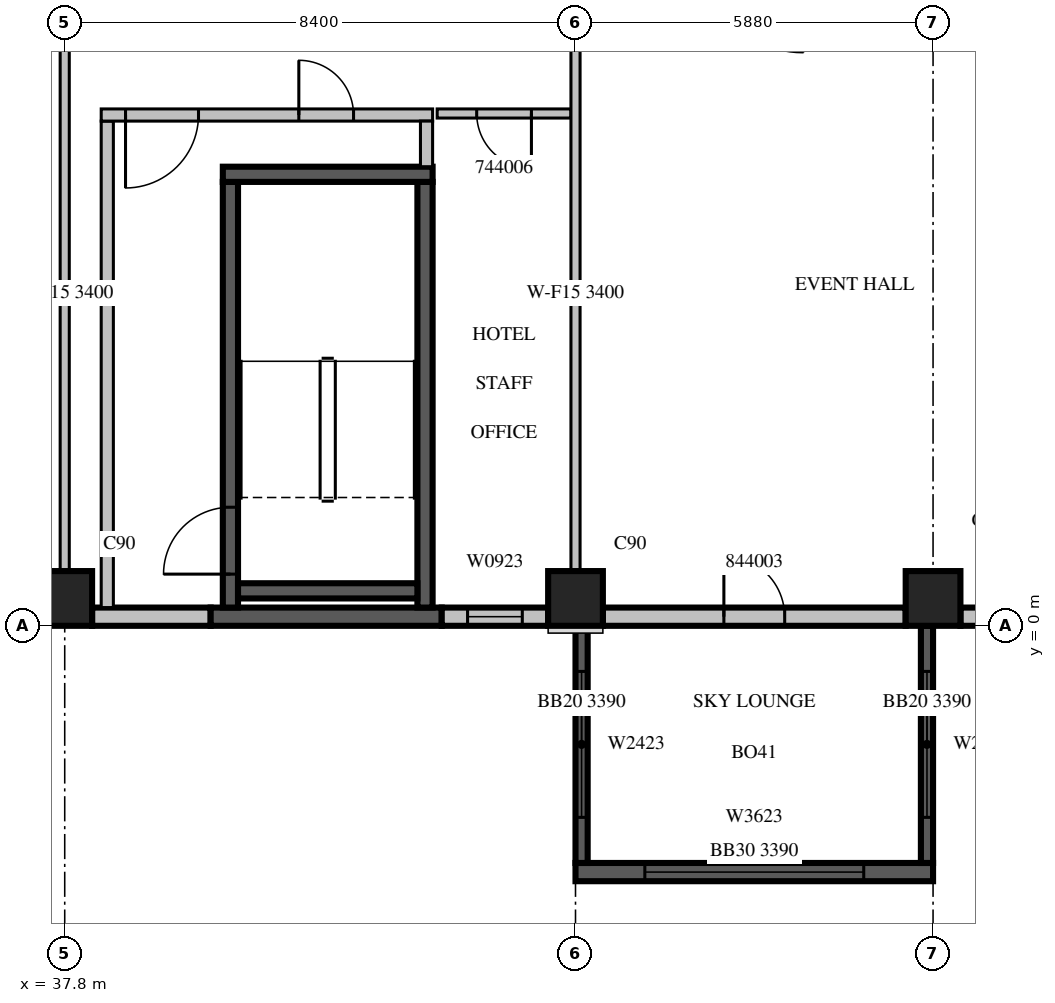
"""IFC4 building model, lengths in metres.
Left out: names, types, materials, properties, quantities, classifications, styles, units other than length and angle.
Written with IfcOpenShell. Run it as: python <this file> out.ifc"""

import sys

from ifc_helpers import new_model, si_unit, direction, frame, frame_2d, origin, origin_2d, place, context, subcontext, project, spatial, rectangle, extrude, source, transform, mapped, element, fill, save


model = new_model("IFC4")
c1 = context("Model", 3, precision=1e-05, world=origin(), true_north=direction((0.0, 1.0)))
c2 = subcontext(c1, "Body", "Model", "MODEL_VIEW")
j1 = project(units=[si_unit("LENGTHUNIT", "METRE"), si_unit("PLANEANGLEUNIT", "RADIAN")], contexts=[c1])
p1 = place(None, origin())
s1 = spatial("IfcSite", under=j1, at=p1, CompositionType="ELEMENT")
p2 = place(p1, origin())
s2 = spatial("IfcBuilding", under=s1, at=p2, CompositionType="ELEMENT")
p3 = place(p2, frame((0.0, 0.0, 200.6)))
s3 = spatial("IfcBuildingStorey", under=s2, at=p3, CompositionType="ELEMENT", Elevation=200.6)
m1 = source(origin(), c2, "Body", "SweptSolid", [
    extrude(rectangle(XDim=0.9, YDim=0.9, at=origin_2d()), origin(), (0.0, 0.0, 1.0), 3.8),
])
for number, where, z_axis, x_axis in (
    (1, (37.8, 0.45, 0.0), (0.0, 0.0, 1.0), (1.0, 0.0, 0.0)),
    (2, (46.2, 0.45, 0.0), (0.0, 0.0, 1.0), (1.0, 0.0, 0.0)),
    (3, (52.08, 0.45, 0.0), (0.0, 0.0, 1.0), (1.0, 0.0, 0.0)),
):
    element("IfcColumn", number, at=place(p3, frame(where, z_axis=z_axis, x_axis=x_axis)), inside=s3, PredefinedType="COLUMN", context=c2, shape_type="MappedRepresentation", body=[
        mapped(m1, transform((0.0, 0.0, 0.0), scale=1.0)),
    ])
m2 = source(origin(), c2, "Body", "SweptSolid", [
    extrude(rectangle(XDim=1.95, YDim=0.3, at=frame_2d((0.975, 0.0))), origin(), (0.0, 0.0, 1.0), 3.4),
])
p4 = place(p3, frame((38.25, 0.15, 0.0), z_axis=(0.0, 0.0, 1.0), x_axis=(1.0, 0.0, 0.0)))
e4 = element("IfcWall", 4, at=p4, inside=s3, PredefinedType="STANDARD", context=c2, shape_type="MappedRepresentation", body=[
    mapped(m2, transform((0.0, 0.0, 0.0), scale=1.0)),
])
m3 = source(origin(), c2, "Body", "SweptSolid", [
    extrude(rectangle(XDim=3.8, YDim=0.3, at=frame_2d((1.9, 0.0))), origin(), (0.0, 0.0, 1.0), 3.4),
])
p5 = place(p3, frame((40.2, 0.15, 0.0), z_axis=(0.0, 0.0, 1.0), x_axis=(1.0, 0.0, 0.0)))
e5 = element("IfcWall", 5, at=p5, inside=s3, PredefinedType="SOLIDWALL", context=c2, shape_type="MappedRepresentation", body=[
    mapped(m3, transform((0.0, 0.0, 0.0), scale=1.0)),
])
m4 = source(origin(), c2, "Body", "SweptSolid", [
    extrude(rectangle(XDim=1.75, YDim=0.3, at=frame_2d((0.875, 0.0))), origin(), (0.0, 0.0, 1.0), 3.4),
])
p6 = place(p3, frame((44.0, 0.15, 0.0), z_axis=(0.0, 0.0, 1.0), x_axis=(1.0, 0.0, 0.0)))
e6 = element("IfcWall", 6, at=p6, inside=s3, PredefinedType="STANDARD", context=c2, shape_type="MappedRepresentation", body=[
    mapped(m4, transform((0.0, 0.0, 0.0), scale=1.0)),
])
m5 = source(origin(), c2, "Body", "SweptSolid", [
    extrude(rectangle(XDim=0.9, YDim=2.3, at=frame_2d((0.45, 1.15))), frame((0.0, 0.16, 0.0), z_axis=(0.0, -1.0, 0.0), x_axis=(1.0, 0.0, 0.0)), (0.0, 0.0, 1.0), 0.32),
])
p7 = place(p6, frame((0.425, 0.0, 0.6)))
e7 = element("IfcOpeningElement", 7, at=p7, cuts=e6, PredefinedType="OPENING", context=c2, shape_type="MappedRepresentation", body=[
    mapped(m5, transform((0.0, 0.0, 0.0), scale=1.0)),
])
m6 = source(origin(), c2, "Body", "SweptSolid", [
    extrude(rectangle(XDim=4.98, YDim=0.3, at=frame_2d((2.49, 0.0))), origin(), (0.0, 0.0, 1.0), 3.4),
])
p8 = place(p3, frame((46.65, 0.15, 0.0), z_axis=(0.0, 0.0, 1.0), x_axis=(1.0, 0.0, 0.0)))
e8 = element("IfcWall", 8, at=p8, inside=s3, PredefinedType="STANDARD", context=c2, shape_type="MappedRepresentation", body=[
    mapped(m6, transform((0.0, 0.0, 0.0), scale=1.0)),
])
m7 = source(origin(), c2, "Body", "SweptSolid", [
    extrude(rectangle(XDim=1.0, YDim=2.1, at=frame_2d((0.5, 1.05))), frame((0.0, 0.16, 0.0), z_axis=(0.0, -1.0, 0.0), x_axis=(1.0, 0.0, 0.0)), (0.0, 0.0, 1.0), 0.32),
])
p9 = place(p8, frame((1.99, 0.0, 0.0)))
e9 = element("IfcOpeningElement", 9, at=p9, cuts=e8, PredefinedType="OPENING", context=c2, shape_type="MappedRepresentation", body=[
    mapped(m7, transform((0.0, 0.0, 0.0), scale=1.0)),
])
m8 = source(origin(), c2, "Body", "SweptSolid", [
    extrude(rectangle(XDim=2.91, YDim=0.3, at=frame_2d((1.455, 0.0))), origin(), (0.0, 0.0, 1.0), 3.4),
])
p10 = place(p3, frame((52.53, 0.15, 0.0), z_axis=(0.0, 0.0, 1.0), x_axis=(1.0, 0.0, 0.0)))
e10 = element("IfcWall", 10, at=p10, inside=s3, PredefinedType="STANDARD", context=c2, shape_type="MappedRepresentation", body=[
    mapped(m8, transform((0.0, 0.0, 0.0), scale=1.0)),
])
m9 = source(origin(), c2, "Body", "SweptSolid", [
    extrude(rectangle(XDim=1.8, YDim=2.3, at=frame_2d((0.9, 1.15))), frame((0.0, 0.16, 0.0), z_axis=(0.0, -1.0, 0.0), x_axis=(1.0, 0.0, 0.0)), (0.0, 0.0, 1.0), 0.32),
])
p11 = place(p10, frame((0.33, 0.0, 0.6)))
e11 = element("IfcOpeningElement", 11, at=p11, cuts=e10, PredefinedType="OPENING", context=c2, shape_type="MappedRepresentation", body=[
    mapped(m9, transform((0.0, 0.0, 0.0), scale=1.0)),
])
m10 = source(origin(), c2, "Body", "SweptSolid", [
    extrude(rectangle(XDim=5.88, YDim=0.3, at=frame_2d((2.94, 0.0))), origin(), (0.0, 0.0, 1.0), 3.39),
])
p12 = place(p3, frame((46.2, -4.05, 0.0), z_axis=(0.0, 0.0, 1.0), x_axis=(1.0, 0.0, 0.0)))
e12 = element("IfcWall", 12, at=p12, inside=s3, PredefinedType="SOLIDWALL", context=c2, shape_type="MappedRepresentation", body=[
    mapped(m10, transform((0.0, 0.0, 0.0), scale=1.0)),
])
m11 = source(origin(), c2, "Body", "SweptSolid", [
    extrude(rectangle(XDim=3.6, YDim=2.3, at=frame_2d((1.8, 1.15))), frame((0.0, 0.16, 0.0), z_axis=(0.0, -1.0, 0.0), x_axis=(1.0, 0.0, 0.0)), (0.0, 0.0, 1.0), 0.32),
])
p13 = place(p12, frame((1.14, 0.0, 0.6)))
e13 = element("IfcOpeningElement", 13, at=p13, cuts=e12, PredefinedType="OPENING", context=c2, shape_type="MappedRepresentation", body=[
    mapped(m11, transform((0.0, 0.0, 0.0), scale=1.0)),
])
m12 = source(origin(), c2, "Body", "SweptSolid", [
    extrude(rectangle(XDim=3.9, YDim=0.2, at=frame_2d((1.95, 0.0))), origin(), (0.0, 0.0, 1.0), 3.39),
])
p14 = place(p3, frame((46.3, 0.0, 0.0), z_axis=(0.0, 0.0, 1.0), x_axis=(0.0, -1.0, 0.0)))
e14 = element("IfcWall", 14, at=p14, inside=s3, PredefinedType="SOLIDWALL", context=c2, shape_type="MappedRepresentation", body=[
    mapped(m12, transform((0.0, 0.0, 0.0), scale=1.0)),
])
m13 = source(origin(), c2, "Body", "SweptSolid", [
    extrude(rectangle(XDim=2.4, YDim=2.3, at=frame_2d((1.2, 1.15))), frame((0.0, 0.11, 0.0), z_axis=(0.0, -1.0, 0.0), x_axis=(1.0, 0.0, 0.0)), (0.0, 0.0, 1.0), 0.22),
])
p15 = place(p14, frame((0.75, 0.0, 0.6)))
e15 = element("IfcOpeningElement", 15, at=p15, cuts=e14, PredefinedType="OPENING", context=c2, shape_type="MappedRepresentation", body=[
    mapped(m13, transform((0.0, 0.0, 0.0), scale=1.0)),
])
p16 = place(p3, frame((51.98, 0.0, 0.0), z_axis=(0.0, 0.0, 1.0), x_axis=(0.0, -1.0, 0.0)))
e16 = element("IfcWall", 16, at=p16, inside=s3, PredefinedType="SOLIDWALL", context=c2, shape_type="MappedRepresentation", body=[
    mapped(m12, transform((0.0, 0.0, 0.0), scale=1.0)),
])
p17 = place(p16, frame((0.75, 0.0, 0.6)))
e17 = element("IfcOpeningElement", 17, at=p17, cuts=e16, PredefinedType="OPENING", context=c2, shape_type="MappedRepresentation", body=[
    mapped(m13, transform((0.0, 0.0, 0.0), scale=1.0)),
])
m14 = source(origin(), c2, "Body", "SweptSolid", [
    extrude(rectangle(XDim=7.0, YDim=0.25, at=frame_2d((3.5, 0.0))), origin(), (0.0, 0.0, 1.0), 3.4),
])
p18 = place(p3, frame((40.525, 0.3, 0.0), z_axis=(0.0, 0.0, 1.0), x_axis=(0.0, 1.0, 0.0)))
e18 = element("IfcWall", 18, at=p18, inside=s3, PredefinedType="SOLIDWALL", context=c2, shape_type="MappedRepresentation", body=[
    mapped(m14, transform((0.0, 0.0, 0.0), scale=1.0)),
])
m15 = source(origin(), c2, "Body", "SweptSolid", [
    extrude(rectangle(XDim=1.1, YDim=2.1, at=frame_2d((0.55, 1.05))), frame((0.0, 0.135, 0.0), z_axis=(0.0, -1.0, 0.0), x_axis=(1.0, 0.0, 0.0)), (0.0, 0.0, 1.0), 0.27),
])
p19 = place(p18, frame((0.55, 0.0, 0.0)))
e19 = element("IfcOpeningElement", 19, at=p19, cuts=e18, PredefinedType="OPENING", context=c2, shape_type="MappedRepresentation", body=[
    mapped(m15, transform((0.0, 0.0, 0.0), scale=1.0)),
])
p20 = place(p3, frame((43.725, 0.3, 0.0), z_axis=(0.0, 0.0, 1.0), x_axis=(0.0, 1.0, 0.0)))
e20 = element("IfcWall", 20, at=p20, inside=s3, PredefinedType="SOLIDWALL", context=c2, shape_type="MappedRepresentation", body=[
    mapped(m14, transform((0.0, 0.0, 0.0), scale=1.0)),
])
m16 = source(origin(), c2, "Body", "SweptSolid", [
    extrude(rectangle(XDim=3.45, YDim=0.25, at=frame_2d((1.725, 0.0))), origin(), (0.0, 0.0, 1.0), 3.4),
])
p21 = place(p3, frame((40.4, 7.425, 0.0), z_axis=(0.0, 0.0, 1.0), x_axis=(1.0, 0.0, 0.0)))
e21 = element("IfcWall", 21, at=p21, inside=s3, PredefinedType="SOLIDWALL", context=c2, shape_type="MappedRepresentation", body=[
    mapped(m16, transform((0.0, 0.0, 0.0), scale=1.0)),
])
m17 = source(origin(), c2, "Body", "SweptSolid", [
    extrude(rectangle(XDim=2.95, YDim=0.25, at=frame_2d((1.475, 0.0))), origin(), (0.0, 0.0, 1.0), 3.4),
])
p22 = place(p3, frame((40.65, 0.575, 0.0), z_axis=(0.0, 0.0, 1.0), x_axis=(1.0, 0.0, 0.0)))
e22 = element("IfcWall", 22, at=p22, inside=s3, PredefinedType="SOLIDWALL", context=c2, shape_type="MappedRepresentation", body=[
    mapped(m17, transform((0.0, 0.0, 0.0), scale=1.0)),
])
m18 = source(origin(), c2, "Body", "SweptSolid", [
    extrude(rectangle(XDim=8.0, YDim=0.2, at=frame_2d((4.0, 0.0))), origin(), (0.0, 0.0, 1.0), 3.4),
])
p23 = place(p3, frame((38.5, 0.3, 0.0), z_axis=(0.0, 0.0, 1.0), x_axis=(0.0, 1.0, 0.0)))
e23 = element("IfcWall", 23, at=p23, inside=s3, PredefinedType="PARTITIONING", context=c2, shape_type="MappedRepresentation", body=[
    mapped(m18, transform((0.0, 0.0, 0.0), scale=1.0)),
])
m19 = source(origin(), c2, "Body", "SweptSolid", [
    extrude(rectangle(XDim=5.45, YDim=0.2, at=frame_2d((2.725, 0.0))), origin(), (0.0, 0.0, 1.0), 3.4),
])
p24 = place(p3, frame((38.4, 8.4, 0.0), z_axis=(0.0, 0.0, 1.0), x_axis=(1.0, 0.0, 0.0)))
e24 = element("IfcWall", 24, at=p24, inside=s3, PredefinedType="PARTITIONING", context=c2, shape_type="MappedRepresentation", body=[
    mapped(m19, transform((0.0, 0.0, 0.0), scale=1.0)),
])
m20 = source(origin(), c2, "Body", "SweptSolid", [
    extrude(rectangle(XDim=1.2, YDim=2.1, at=frame_2d((0.6, 1.05))), frame((0.0, 0.11, 0.0), z_axis=(0.0, -1.0, 0.0), x_axis=(1.0, 0.0, 0.0)), (0.0, 0.0, 1.0), 0.22),
])
p25 = place(p24, frame((0.4, 0.0, 0.0)))
e25 = element("IfcOpeningElement", 25, at=p25, cuts=e24, PredefinedType="OPENING", context=c2, shape_type="MappedRepresentation", body=[
    mapped(m20, transform((0.0, 0.0, 0.0), scale=1.0)),
])
m21 = source(origin(), c2, "Body", "SweptSolid", [
    extrude(rectangle(XDim=0.9, YDim=2.1, at=frame_2d((0.45, 1.05))), frame((0.0, 0.11, 0.0), z_axis=(0.0, -1.0, 0.0), x_axis=(1.0, 0.0, 0.0)), (0.0, 0.0, 1.0), 0.22),
])
p26 = place(p24, frame((3.25, 0.0, 0.0)))
e26 = element("IfcOpeningElement", 26, at=p26, cuts=e24, PredefinedType="OPENING", context=c2, shape_type="MappedRepresentation", body=[
    mapped(m21, transform((0.0, 0.0, 0.0), scale=1.0)),
])
m22 = source(origin(), c2, "Body", "SweptSolid", [
    extrude(rectangle(XDim=0.75, YDim=0.2, at=frame_2d((0.375, 0.0))), origin(), (0.0, 0.0, 1.0), 3.4),
])
p27 = place(p3, frame((43.75, 7.55, 0.0), z_axis=(0.0, 0.0, 1.0), x_axis=(0.0, 1.0, 0.0)))
e27 = element("IfcWall", 27, at=p27, inside=s3, PredefinedType="PARTITIONING", context=c2, shape_type="MappedRepresentation", body=[
    mapped(m22, transform((0.0, 0.0, 0.0), scale=1.0)),
])
m23 = source(origin(), c2, "Body", "SweptSolid", [
    extrude(rectangle(XDim=2.2, YDim=0.15, at=frame_2d((1.1, 0.0))), origin(), (0.0, 0.0, 1.0), 3.4),
])
p28 = place(p3, frame((46.125, 8.425, 0.0), z_axis=(0.0, 0.0, 1.0), x_axis=(-1.0, 0.0, 0.0)))
e28 = element("IfcWall", 28, at=p28, inside=s3, PredefinedType="PARTITIONING", context=c2, shape_type="MappedRepresentation", body=[
    mapped(m23, transform((0.0, 0.0, 0.0), scale=1.0)),
])
m24 = source(origin(), c2, "Body", "SweptSolid", [
    extrude(rectangle(XDim=0.9, YDim=2.1, at=frame_2d((0.45, 1.05))), frame((0.0, 0.085, 0.0), z_axis=(0.0, -1.0, 0.0), x_axis=(1.0, 0.0, 0.0)), (0.0, 0.0, 1.0), 0.17),
])
p29 = place(p28, frame((0.65, 0.0, 0.0)))
e29 = element("IfcOpeningElement", 29, at=p29, cuts=e28, PredefinedType="OPENING", context=c2, shape_type="MappedRepresentation", body=[
    mapped(m24, transform((0.0, 0.0, 0.0), scale=1.0)),
])
m25 = source(origin(), c2, "Body", "SweptSolid", [
    extrude(rectangle(XDim=9.152, YDim=0.15, at=frame_2d((4.576, 0.0))), origin(), (0.0, 0.0, 1.0), 3.4),
])
for number, where, z_axis, x_axis in (
    (30, (37.8, 0.899, 0.0), (0.0, 0.0, 1.0), (0.0, 1.0, 0.0)),
    (31, (46.2, 0.899, 0.0), (0.0, 0.0, 1.0), (0.0, 1.0, 0.0)),
):
    element("IfcWall", number, at=place(p3, frame(where, z_axis=z_axis, x_axis=x_axis)), inside=s3, PredefinedType="PARTITIONING", context=c2, shape_type="MappedRepresentation", body=[
        mapped(m25, transform((0.0, 0.0, 0.0), scale=1.0)),
    ])
m26 = source(origin(), c2, "Body", "SweptSolid", [
    extrude(rectangle(XDim=0.9, YDim=2.3, at=frame_2d((0.45, 1.15))), frame((0.0, 0.03, 0.0), z_axis=(0.0, -1.0, 0.0), x_axis=(1.0, 0.0, 0.0)), (0.0, 0.0, 1.0), 0.06),
])
p30 = place(p7, origin())
e32 = element("IfcWindow", 32, at=p30, inside=s3, PartitioningType="SINGLE_PANEL", PredefinedType="WINDOW", context=c2, shape_type="MappedRepresentation", body=[
    mapped(m26, transform((0.0, 0.0, 0.0), scale=1.0)),
])
fill(e7, e32)
m27 = source(origin(), c2, "Body", "SweptSolid", [
    extrude(rectangle(XDim=3.6, YDim=2.3, at=frame_2d((1.8, 1.15))), frame((0.0, 0.03, 0.0), z_axis=(0.0, -1.0, 0.0), x_axis=(1.0, 0.0, 0.0)), (0.0, 0.0, 1.0), 0.06),
])
p31 = place(p13, origin())
e33 = element("IfcWindow", 33, at=p31, inside=s3, PartitioningType="SINGLE_PANEL", PredefinedType="WINDOW", context=c2, shape_type="MappedRepresentation", body=[
    mapped(m27, transform((0.0, 0.0, 0.0), scale=1.0)),
])
fill(e13, e33)
m28 = source(origin(), c2, "Body", "SweptSolid", [
    extrude(rectangle(XDim=2.4, YDim=2.3, at=frame_2d((1.2, 1.15))), frame((0.0, 0.03, 0.0), z_axis=(0.0, -1.0, 0.0), x_axis=(1.0, 0.0, 0.0)), (0.0, 0.0, 1.0), 0.06),
])
p32 = place(p15, origin())
e34 = element("IfcWindow", 34, at=p32, inside=s3, PartitioningType="SINGLE_PANEL", PredefinedType="WINDOW", context=c2, shape_type="MappedRepresentation", body=[
    mapped(m28, transform((0.0, 0.0, 0.0), scale=1.0)),
])
fill(e15, e34)
p33 = place(p17, origin())
e35 = element("IfcWindow", 35, at=p33, inside=s3, PartitioningType="SINGLE_PANEL", PredefinedType="WINDOW", context=c2, shape_type="MappedRepresentation", body=[
    mapped(m28, transform((0.0, 0.0, 0.0), scale=1.0)),
])
fill(e17, e35)
m29 = source(origin(), c2, "Body", "SweptSolid", [
    extrude(rectangle(XDim=1.1, YDim=2.1, at=frame_2d((0.55, 1.05))), frame((0.0, 0.025, 0.0), z_axis=(0.0, -1.0, 0.0), x_axis=(1.0, 0.0, 0.0)), (0.0, 0.0, 1.0), 0.05),
])
p34 = place(p19, origin())
e36 = element("IfcDoor", 36, at=p34, inside=s3, OperationType="SINGLE_SWING_LEFT", PredefinedType="DOOR", context=c2, shape_type="MappedRepresentation", body=[
    mapped(m29, transform((0.0, 0.0, 0.0), scale=1.0)),
])
fill(e19, e36)
m30 = source(origin(), c2, "Body", "SweptSolid", [
    extrude(rectangle(XDim=1.2, YDim=2.1, at=frame_2d((0.6, 1.05))), frame((0.0, 0.025, 0.0), z_axis=(0.0, -1.0, 0.0), x_axis=(1.0, 0.0, 0.0)), (0.0, 0.0, 1.0), 0.05),
])
p35 = place(p25, origin())
e37 = element("IfcDoor", 37, at=p35, inside=s3, OperationType="SINGLE_SWING_RIGHT", PredefinedType="DOOR", context=c2, shape_type="MappedRepresentation", body=[
    mapped(m30, transform((0.0, 0.0, 0.0), scale=1.0)),
])
fill(e25, e37)
m31 = source(origin(), c2, "Body", "SweptSolid", [
    extrude(rectangle(XDim=0.9, YDim=2.1, at=frame_2d((0.45, 1.05))), frame((0.0, 0.025, 0.0), z_axis=(0.0, -1.0, 0.0), x_axis=(1.0, 0.0, 0.0)), (0.0, 0.0, 1.0), 0.05),
])
p36 = place(p26, origin())
e38 = element("IfcDoor", 38, at=p36, inside=s3, OperationType="SINGLE_SWING_LEFT", PredefinedType="DOOR", context=c2, shape_type="MappedRepresentation", body=[
    mapped(m31, transform((0.0, 0.0, 0.0), scale=1.0)),
])
fill(e26, e38)
p37 = place(p29, origin())
e39 = element("IfcDoor", 39, at=p37, inside=s3, OperationType="SINGLE_SWING_LEFT", PredefinedType="DOOR", context=c2, shape_type="MappedRepresentation", body=[
    mapped(m31, transform((0.0, 0.0, 0.0), scale=1.0)),
])
fill(e29, e39)
m32 = source(origin(), c2, "Body", "SweptSolid", [
    extrude(rectangle(XDim=1.0, YDim=2.1, at=frame_2d((0.5, 1.05))), frame((0.0, 0.025, 0.0), z_axis=(0.0, -1.0, 0.0), x_axis=(1.0, 0.0, 0.0)), (0.0, 0.0, 1.0), 0.05),
])
p38 = place(p9, origin())
e40 = element("IfcDoor", 40, at=p38, inside=s3, OperationType="SINGLE_SWING_LEFT", PredefinedType="DOOR", context=c2, shape_type="MappedRepresentation", body=[
    mapped(m32, transform((0.0, 0.0, 0.0), scale=1.0)),
])
fill(e9, e40)
save(model, sys.argv[1])
